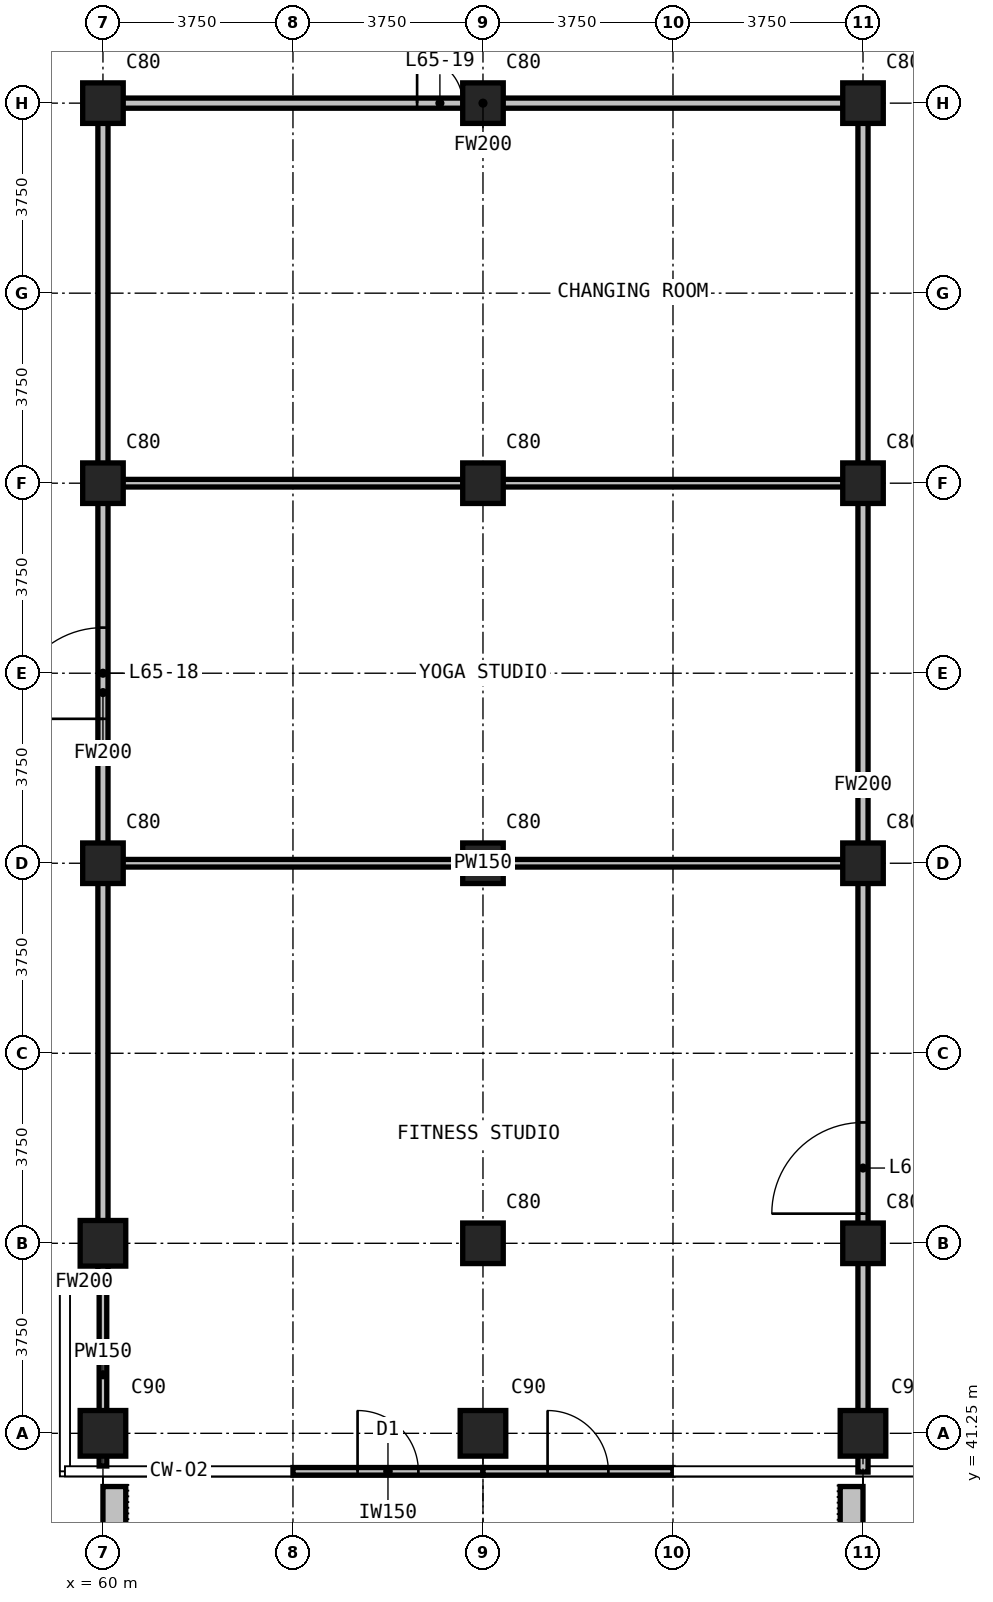
"""IFC4 building model, lengths in metres.
Left out: names, types, materials, properties, quantities, classifications, styles, units other than length and angle.
Written with IfcOpenShell. Run it as: python <this file> out.ifc"""

import sys

from ifc_helpers import new_model, si_unit, direction, frame, frame_2d, origin, origin_2d, place, context, subcontext, project, spatial, rectangle, extrude, element, fill, save


model = new_model("IFC4")
c1 = context("Model", 3, precision=1e-05, world=origin(), true_north=direction((0.0, 1.0)))
c2 = subcontext(c1, "Body", "Model", "MODEL_VIEW")
j1 = project(units=[si_unit("LENGTHUNIT", "METRE"), si_unit("PLANEANGLEUNIT", "RADIAN")], contexts=[c1])
p1 = place(None, origin())
s1 = spatial("IfcSite", under=j1, at=p1, CompositionType="ELEMENT")
p2 = place(p1, origin())
s2 = spatial("IfcBuilding", under=s1, at=p2, CompositionType="ELEMENT")
p3 = place(p2, frame((0.0, 0.0, 249.9)))
s3 = spatial("IfcBuildingStorey", under=s2, at=p3, CompositionType="ELEMENT", Elevation=249.9)
for number, where, z_axis, x_axis in (
    (1, (60.0, 41.25, 0.0), (0.0, 0.0, 1.0), (1.0, 0.0, 0.0)),
    (2, (60.0, 45.0, 0.0), (0.0, 0.0, 1.0), (1.0, 0.0, 0.0)),
):
    element("IfcColumn", number, at=place(p3, frame(where, z_axis=z_axis, x_axis=x_axis)), inside=s3, PredefinedType="COLUMN", context=c2, shape_type="SweptSolid", body=[
        extrude(rectangle(XDim=0.9, YDim=0.9, at=origin_2d()), origin(), (0.0, 0.0, 1.0), 3.6),
    ])
for number, where, z_axis, x_axis in (
    (3, (60.0, 52.5, 0.0), (0.0, 0.0, 1.0), (1.0, 0.0, 0.0)),
    (4, (60.0, 60.0, 0.0), (0.0, 0.0, 1.0), (1.0, 0.0, 0.0)),
    (5, (60.0, 67.5, 0.0), (0.0, 0.0, 1.0), (1.0, 0.0, 0.0)),
):
    element("IfcColumn", number, at=place(p3, frame(where, z_axis=z_axis, x_axis=x_axis)), inside=s3, PredefinedType="COLUMN", context=c2, shape_type="SweptSolid", body=[
        extrude(rectangle(XDim=0.8, YDim=0.8, at=origin_2d()), origin(), (0.0, 0.0, 1.0), 3.6),
    ])
p4 = place(p3, frame((67.5, 41.25, 0.0), z_axis=(0.0, 0.0, 1.0), x_axis=(1.0, 0.0, 0.0)))
e6 = element("IfcColumn", 6, at=p4, inside=s3, PredefinedType="COLUMN", context=c2, shape_type="SweptSolid", body=[
    extrude(rectangle(XDim=0.9, YDim=0.9, at=origin_2d()), origin(), (0.0, 0.0, 1.0), 3.6),
])
for number, where, z_axis, x_axis in (
    (7, (67.5, 45.0, 0.0), (0.0, 0.0, 1.0), (1.0, 0.0, 0.0)),
    (8, (67.5, 52.5, 0.0), (0.0, 0.0, 1.0), (1.0, 0.0, 0.0)),
    (9, (67.5, 60.0, 0.0), (0.0, 0.0, 1.0), (1.0, 0.0, 0.0)),
    (10, (67.5, 67.5, 0.0), (0.0, 0.0, 1.0), (1.0, 0.0, 0.0)),
):
    element("IfcColumn", number, at=place(p3, frame(where, z_axis=z_axis, x_axis=x_axis)), inside=s3, PredefinedType="COLUMN", context=c2, shape_type="SweptSolid", body=[
        extrude(rectangle(XDim=0.8, YDim=0.8, at=origin_2d()), origin(), (0.0, 0.0, 1.0), 3.6),
    ])
p5 = place(p3, frame((75.0, 41.25, 0.0), z_axis=(0.0, 0.0, 1.0), x_axis=(1.0, 0.0, 0.0)))
e11 = element("IfcColumn", 11, at=p5, inside=s3, PredefinedType="COLUMN", context=c2, shape_type="SweptSolid", body=[
    extrude(rectangle(XDim=0.9, YDim=0.9, at=origin_2d()), origin(), (0.0, 0.0, 1.0), 3.6),
])
for number, where, z_axis, x_axis in (
    (12, (75.0, 45.0, 0.0), (0.0, 0.0, 1.0), (1.0, 0.0, 0.0)),
    (13, (75.0, 52.5, 0.0), (0.0, 0.0, 1.0), (1.0, 0.0, 0.0)),
    (14, (75.0, 60.0, 0.0), (0.0, 0.0, 1.0), (1.0, 0.0, 0.0)),
    (15, (75.0, 67.5, 0.0), (0.0, 0.0, 1.0), (1.0, 0.0, 0.0)),
):
    element("IfcColumn", number, at=place(p3, frame(where, z_axis=z_axis, x_axis=x_axis)), inside=s3, PredefinedType="COLUMN", context=c2, shape_type="SweptSolid", body=[
        extrude(rectangle(XDim=0.8, YDim=0.8, at=origin_2d()), origin(), (0.0, 0.0, 1.0), 3.6),
    ])
p6 = place(p3, frame((63.75, 40.5, 0.0), z_axis=(0.0, 0.0, 1.0), x_axis=(1.0, 0.0, 0.0)))
e16 = element("IfcWall", 16, at=p6, inside=s3, PredefinedType="SOLIDWALL", context=c2, shape_type="SweptSolid", body=[
    extrude(rectangle(XDim=3.75, YDim=0.15, at=frame_2d((1.875, 0.0))), origin(), (0.0, 0.0, 1.0), 3.25),
])
p7 = place(p6, frame((1.275, 0.0, 0.0)))
e17 = element("IfcOpeningElement", 17, at=p7, cuts=e16, PredefinedType="OPENING", context=c2, shape_type="SweptSolid", body=[
    extrude(rectangle(XDim=1.2, YDim=2.4, at=frame_2d((0.6, 1.2))), frame((0.0, 0.085, 0.0), z_axis=(0.0, -1.0, 0.0), x_axis=(1.0, 0.0, 0.0)), (0.0, 0.0, 1.0), 0.17),
])
p8 = place(p3, frame((67.5, 40.5, 0.0), z_axis=(0.0, 0.0, 1.0), x_axis=(1.0, 0.0, 0.0)))
e18 = element("IfcWall", 18, at=p8, inside=s3, PredefinedType="SOLIDWALL", context=c2, shape_type="SweptSolid", body=[
    extrude(rectangle(XDim=3.75, YDim=0.15, at=frame_2d((1.875, 0.0))), origin(), (0.0, 0.0, 1.0), 3.25),
])
p9 = place(p8, frame((1.275, 0.0, 0.0)))
e19 = element("IfcOpeningElement", 19, at=p9, cuts=e18, PredefinedType="OPENING", context=c2, shape_type="SweptSolid", body=[
    extrude(rectangle(XDim=1.2, YDim=2.4, at=frame_2d((0.6, 1.2))), frame((0.0, 0.085, 0.0), z_axis=(0.0, -1.0, 0.0), x_axis=(1.0, 0.0, 0.0)), (0.0, 0.0, 1.0), 0.17),
])
for number, where, z_axis, x_axis in (
    (20, (60.225, 40.2, 0.0), (0.0, 0.0, 1.0), (0.0, -1.0, 0.0)),
    (21, (74.775, 40.2, 0.0), (0.0, 0.0, 1.0), (0.0, -1.0, 0.0)),
):
    element("IfcWall", number, at=place(p3, frame(where, z_axis=z_axis, x_axis=x_axis)), inside=s3, PredefinedType="USERDEFINED", context=c2, shape_type="SweptSolid", body=[
        extrude(rectangle(XDim=2.35, YDim=0.45, at=frame_2d((1.175, 0.0))), origin(), (0.0, 0.0, 1.0), 1.1),
    ])
p10 = place(p3, frame((59.355, 44.235, 0.0), z_axis=(0.0, 0.0, 1.0), x_axis=(1.0, 0.0, 0.0)))
e22 = element("IfcWall", 22, at=p10, inside=s3, PredefinedType="PARTITIONING", context=c2, shape_type="SweptSolid", body=[
    extrude(rectangle(XDim=0.545, YDim=0.2, at=frame_2d((0.272, 0.0))), origin(), (0.0, 0.0, 1.0), 3.25),
])
p11 = place(p3, frame((60.1, 67.5, 0.0), z_axis=(0.0, 0.0, 1.0), x_axis=(1.0, 0.0, 0.0)))
e23 = element("IfcWall", 23, at=p11, inside=s3, PredefinedType="PARTITIONING", context=c2, shape_type="SweptSolid", body=[
    extrude(rectangle(XDim=14.8, YDim=0.2, at=frame_2d((7.4, 0.0))), origin(), (0.0, 0.0, 1.0), 3.25),
])
p12 = place(p11, frame((6.1, 0.0, 0.0)))
e24 = element("IfcOpeningElement", 24, at=p12, cuts=e23, PredefinedType="OPENING", context=c2, shape_type="SweptSolid", body=[
    extrude(rectangle(XDim=0.9, YDim=2.2, at=frame_2d((0.45, 1.1))), frame((0.0, 0.11, 0.0), z_axis=(0.0, -1.0, 0.0), x_axis=(1.0, 0.0, 0.0)), (0.0, 0.0, 1.0), 0.22),
])
p13 = place(p3, frame((60.0, 44.135, 0.0), z_axis=(0.0, 0.0, 1.0), x_axis=(0.0, 1.0, 0.0)))
e25 = element("IfcWall", 25, at=p13, inside=s3, PredefinedType="PARTITIONING", context=c2, shape_type="SweptSolid", body=[
    extrude(rectangle(XDim=23.465, YDim=0.2, at=frame_2d((11.732, 0.0))), origin(), (0.0, 0.0, 1.0), 3.25),
])
p14 = place(p13, frame((11.215, 0.0, 0.0)))
e26 = element("IfcOpeningElement", 26, at=p14, cuts=e25, PredefinedType="OPENING", context=c2, shape_type="SweptSolid", body=[
    extrude(rectangle(XDim=1.8, YDim=2.2, at=frame_2d((0.9, 1.1))), frame((0.0, 0.11, 0.0), z_axis=(0.0, -1.0, 0.0), x_axis=(1.0, 0.0, 0.0)), (0.0, 0.0, 1.0), 0.22),
])
p15 = place(p3, frame((75.0, 40.485, 0.0), z_axis=(0.0, 0.0, 1.0), x_axis=(0.0, 1.0, 0.0)))
e27 = element("IfcWall", 27, at=p15, inside=s3, PredefinedType="PARTITIONING", context=c2, shape_type="SweptSolid", body=[
    extrude(rectangle(XDim=27.115, YDim=0.2, at=frame_2d((13.558, 0.0))), origin(), (0.0, 0.0, 1.0), 3.25),
])
p16 = place(p15, frame((5.1, 0.0, 0.0)))
e28 = element("IfcOpeningElement", 28, at=p16, cuts=e27, PredefinedType="OPENING", context=c2, shape_type="SweptSolid", body=[
    extrude(rectangle(XDim=1.8, YDim=2.2, at=frame_2d((0.9, 1.1))), frame((0.0, 0.11, 0.0), z_axis=(0.0, -1.0, 0.0), x_axis=(1.0, 0.0, 0.0)), (0.0, 0.0, 1.0), 0.22),
])
for number, where, z_axis, x_axis in (
    (29, (60.1, 52.5, 0.0), (0.0, 0.0, 1.0), (1.0, 0.0, 0.0)),
    (30, (60.1, 60.0, 0.0), (0.0, 0.0, 1.0), (1.0, 0.0, 0.0)),
):
    element("IfcWall", number, at=place(p3, frame(where, z_axis=z_axis, x_axis=x_axis)), inside=s3, PredefinedType="PARTITIONING", context=c2, shape_type="SweptSolid", body=[
        extrude(rectangle(XDim=14.8, YDim=0.15, at=frame_2d((7.4, 0.0))), origin(), (0.0, 0.0, 1.0), 3.25),
    ])
p17 = place(p3, frame((60.0, 40.605, 0.0), z_axis=(0.0, 0.0, 1.0), x_axis=(0.0, 1.0, 0.0)))
e31 = element("IfcWall", 31, at=p17, inside=s3, PredefinedType="PARTITIONING", context=c2, shape_type="SweptSolid", body=[
    extrude(rectangle(XDim=3.6, YDim=0.15, at=frame_2d((1.8, 0.0))), origin(), (0.0, 0.0, 1.0), 3.25),
])
p18 = place(p7, origin())
e32 = element("IfcDoor", 32, at=p18, inside=s3, OperationType="SINGLE_SWING_LEFT", PredefinedType="DOOR", context=c2, shape_type="SweptSolid", body=[
    extrude(rectangle(XDim=1.2, YDim=2.4, at=frame_2d((0.6, 1.2))), frame((0.0, 0.025, 0.0), z_axis=(0.0, -1.0, 0.0), x_axis=(1.0, 0.0, 0.0)), (0.0, 0.0, 1.0), 0.05),
])
fill(e17, e32)
p19 = place(p9, origin())
e33 = element("IfcDoor", 33, at=p19, inside=s3, OperationType="SINGLE_SWING_LEFT", PredefinedType="DOOR", context=c2, shape_type="SweptSolid", body=[
    extrude(rectangle(XDim=1.2, YDim=2.4, at=frame_2d((0.6, 1.2))), frame((0.0, 0.025, 0.0), z_axis=(0.0, -1.0, 0.0), x_axis=(1.0, 0.0, 0.0)), (0.0, 0.0, 1.0), 0.05),
])
fill(e19, e33)
p20 = place(p16, origin())
e34 = element("IfcDoor", 34, at=p20, inside=s3, OperationType="DOUBLE_DOOR_SINGLE_SWING", PredefinedType="DOOR", context=c2, shape_type="SweptSolid", body=[
    extrude(rectangle(XDim=1.8, YDim=2.2, at=frame_2d((0.9, 1.1))), frame((0.0, 0.025, 0.0), z_axis=(0.0, -1.0, 0.0), x_axis=(1.0, 0.0, 0.0)), (0.0, 0.0, 1.0), 0.05),
])
fill(e28, e34)
p21 = place(p14, origin())
e35 = element("IfcDoor", 35, at=p21, inside=s3, OperationType="DOUBLE_DOOR_SINGLE_SWING", PredefinedType="DOOR", context=c2, shape_type="SweptSolid", body=[
    extrude(rectangle(XDim=1.8, YDim=2.2, at=frame_2d((0.9, 1.1))), frame((0.0, 0.025, 0.0), z_axis=(0.0, -1.0, 0.0), x_axis=(1.0, 0.0, 0.0)), (0.0, 0.0, 1.0), 0.05),
])
fill(e26, e35)
p22 = place(p12, origin())
e36 = element("IfcDoor", 36, at=p22, inside=s3, OperationType="SINGLE_SWING_LEFT", PredefinedType="DOOR", context=c2, shape_type="SweptSolid", body=[
    extrude(rectangle(XDim=0.9, YDim=2.2, at=frame_2d((0.45, 1.1))), frame((0.0, 0.025, 0.0), z_axis=(0.0, -1.0, 0.0), x_axis=(1.0, 0.0, 0.0)), (0.0, 0.0, 1.0), 0.05),
])
fill(e24, e36)
save(model, sys.argv[1])
